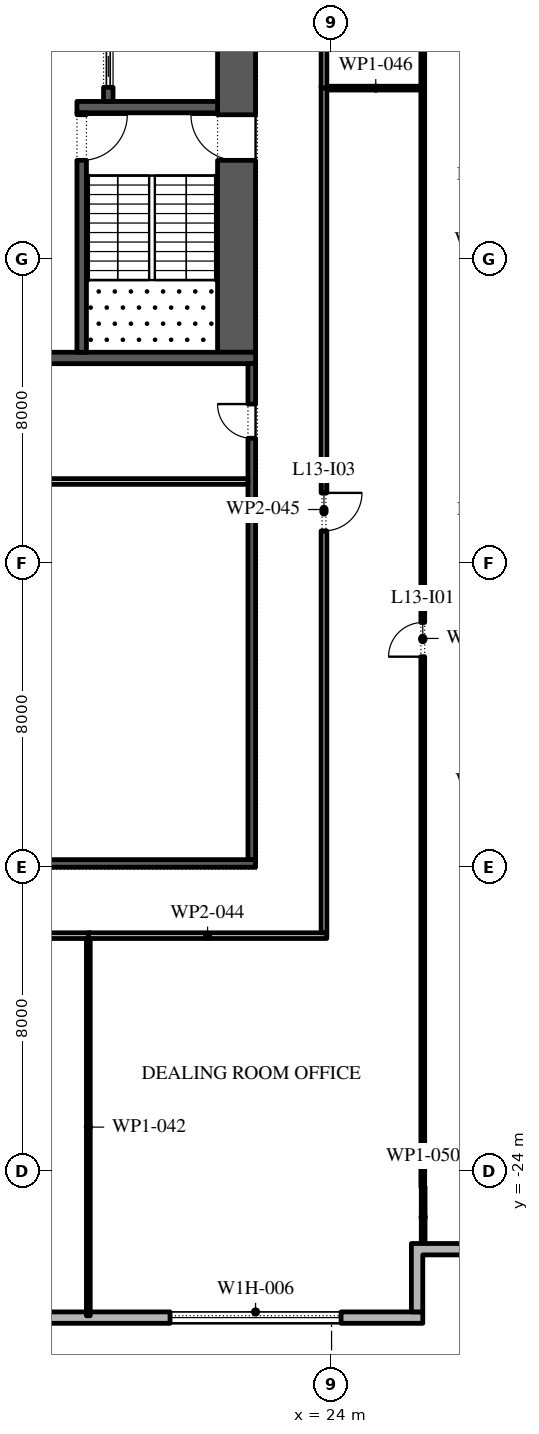
"""IFC4 building model, lengths in metres.
Left out: names, types, materials, properties, quantities, classifications, styles, units other than length and angle.
Written with IfcOpenShell. Run it as: python <this file> out.ifc"""

import sys

from ifc_helpers import new_model, si_unit, direction, frame, frame_2d, origin, place, context, subcontext, project, spatial, polyline, rectangle, outline, extrude, element, fill, save


model = new_model("IFC4")
c1 = context("Model", 3, precision=1e-05, world=origin(), true_north=direction((0.0, 1.0)))
c2 = subcontext(c1, "Body", "Model", "MODEL_VIEW")
j1 = project(units=[si_unit("LENGTHUNIT", "METRE"), si_unit("PLANEANGLEUNIT", "RADIAN")], contexts=[c1])
p1 = place(None, origin())
s1 = spatial("IfcSite", under=j1, at=p1, CompositionType="ELEMENT")
p2 = place(p1, origin())
s2 = spatial("IfcBuilding", under=s1, at=p2, CompositionType="ELEMENT")
p3 = place(p2, frame((0.0, 0.0, 64.8)))
s3 = spatial("IfcBuildingStorey", under=s2, at=p3, CompositionType="ELEMENT", Elevation=64.8)
p4 = place(p3, frame((-26.1, -27.85, 0.0), z_axis=(0.0, 0.0, 1.0), x_axis=(1.0, 0.0, 0.0)))
e1 = element("IfcWall", 1, at=p4, inside=s3, PredefinedType="STANDARD", context=c2, shape_type="SweptSolid", body=[
    extrude(rectangle(XDim=52.5, YDim=0.3, at=frame_2d((26.25, 0.0))), origin(), (0.0, 0.0, 1.0), 4.0),
])
p5 = place(p4, frame((2.0, 0.0, 0.45)))
e2 = element("IfcOpeningElement", 2, at=p5, cuts=e1, PredefinedType="OPENING", context=c2, shape_type="SweptSolid", body=[
    extrude(rectangle(XDim=4.5, YDim=2.75, at=frame_2d((2.25, 1.375))), frame((0.0, 0.16, 0.0), z_axis=(0.0, -1.0, 0.0), x_axis=(1.0, 0.0, 0.0)), (0.0, 0.0, 1.0), 0.32),
])
p6 = place(p4, frame((10.65, 0.0, 0.45)))
e3 = element("IfcOpeningElement", 3, at=p6, cuts=e1, PredefinedType="OPENING", context=c2, shape_type="SweptSolid", body=[
    extrude(rectangle(XDim=4.5, YDim=2.75, at=frame_2d((2.25, 1.375))), frame((0.0, 0.16, 0.0), z_axis=(0.0, -1.0, 0.0), x_axis=(1.0, 0.0, 0.0)), (0.0, 0.0, 1.0), 0.32),
])
p7 = place(p4, frame((20.5, 0.0, 0.0)))
e4 = element("IfcOpeningElement", 4, at=p7, cuts=e1, PredefinedType="OPENING", context=c2, shape_type="SweptSolid", body=[
    extrude(rectangle(XDim=2.4, YDim=3.5, at=frame_2d((1.2, 1.75))), frame((0.0, 0.16, 0.0), z_axis=(0.0, -1.0, 0.0), x_axis=(1.0, 0.0, 0.0)), (0.0, 0.0, 1.0), 0.32),
])
p8 = place(p4, frame((28.25, 0.0, 0.45)))
e5 = element("IfcOpeningElement", 5, at=p8, cuts=e1, PredefinedType="OPENING", context=c2, shape_type="SweptSolid", body=[
    extrude(rectangle(XDim=4.5, YDim=2.75, at=frame_2d((2.25, 1.375))), frame((0.0, 0.16, 0.0), z_axis=(0.0, -1.0, 0.0), x_axis=(1.0, 0.0, 0.0)), (0.0, 0.0, 1.0), 0.32),
])
p9 = place(p4, frame((37.05, 0.0, 0.45)))
e6 = element("IfcOpeningElement", 6, at=p9, cuts=e1, PredefinedType="OPENING", context=c2, shape_type="SweptSolid", body=[
    extrude(rectangle(XDim=4.5, YDim=2.75, at=frame_2d((2.25, 1.375))), frame((0.0, 0.16, 0.0), z_axis=(0.0, -1.0, 0.0), x_axis=(1.0, 0.0, 0.0)), (0.0, 0.0, 1.0), 0.32),
])
p10 = place(p4, frame((45.85, 0.0, 0.45)))
e7 = element("IfcOpeningElement", 7, at=p10, cuts=e1, PredefinedType="OPENING", context=c2, shape_type="SweptSolid", body=[
    extrude(rectangle(XDim=4.5, YDim=2.75, at=frame_2d((2.25, 1.375))), frame((0.0, 0.16, 0.0), z_axis=(0.0, -1.0, 0.0), x_axis=(1.0, 0.0, 0.0)), (0.0, 0.0, 1.0), 0.32),
])
p11 = place(p3, origin())
e8 = element("IfcWall", 8, at=p11, inside=s3, PredefinedType="STANDARD", context=c2, shape_type="SweptSolid", body=[
    extrude(outline(polyline([(27.9, -25.9), (27.9, -24.1), (30.0, -24.1), (30.0, -24.4), (28.2, -24.4), (28.2, -26.2), (26.4, -26.2), (26.4, -27.7), (26.1, -27.7), (26.1, -25.9), (27.9, -25.9)])), origin(), (0.0, 0.0, 1.0), 4.0),
])
p12 = place(p3, frame((21.5, -2.45, 0.0), z_axis=(0.0, 0.0, 1.0), x_axis=(0.0, 1.0, 0.0)))
e9 = element("IfcWall", 9, at=p12, inside=s3, PredefinedType="SHEAR", context=c2, shape_type="SweptSolid", body=[
    extrude(rectangle(XDim=27.9, YDim=1.0, at=frame_2d((13.95, 0.0))), origin(), (0.0, 0.0, 1.0), 4.0),
])
p13 = place(p12, frame((5.05, 0.0, 0.0)))
e10 = element("IfcOpeningElement", 10, at=p13, cuts=e9, PredefinedType="OPENING", context=c2, shape_type="SweptSolid", body=[
    extrude(rectangle(XDim=1.2, YDim=2.1, at=frame_2d((0.6, 1.05))), frame((0.0, 0.51, 0.0), z_axis=(0.0, -1.0, 0.0), x_axis=(1.0, 0.0, 0.0)), (0.0, 0.0, 1.0), 1.02),
])
p14 = place(p12, frame((21.65, 0.0, 0.0)))
e11 = element("IfcOpeningElement", 11, at=p14, cuts=e9, PredefinedType="OPENING", context=c2, shape_type="SweptSolid", body=[
    extrude(rectangle(XDim=1.2, YDim=2.1, at=frame_2d((0.6, 1.05))), frame((0.0, 0.51, 0.0), z_axis=(0.0, -1.0, 0.0), x_axis=(1.0, 0.0, 0.0)), (0.0, 0.0, 1.0), 1.02),
])
p15 = place(p3, frame((10.0, -2.6, 0.0), z_axis=(0.0, 0.0, 1.0), x_axis=(1.0, 0.0, 0.0)))
e12 = element("IfcWall", 12, at=p15, inside=s3, PredefinedType="SHEAR", context=c2, shape_type="SweptSolid", body=[
    extrude(rectangle(XDim=12.0, YDim=0.3, at=frame_2d((6.0, 0.0))), origin(), (0.0, 0.0, 1.0), 4.0),
])
p16 = place(p3, frame((17.3, 4.0, 0.0), z_axis=(0.0, 0.0, 1.0), x_axis=(1.0, 0.0, 0.0)))
e13 = element("IfcWall", 13, at=p16, inside=s3, PredefinedType="SHEAR", context=c2, shape_type="SweptSolid", body=[
    extrude(rectangle(XDim=3.7, YDim=0.3, at=frame_2d((1.85, 0.0))), origin(), (0.0, 0.0, 1.0), 4.0),
])
p17 = place(p3, frame((17.425, -2.45, 0.0), z_axis=(0.0, 0.0, 1.0), x_axis=(0.0, 1.0, 0.0)))
e14 = element("IfcWall", 14, at=p17, inside=s3, PredefinedType="SHEAR", context=c2, shape_type="SweptSolid", body=[
    extrude(rectangle(XDim=6.3, YDim=0.25, at=frame_2d((3.15, 0.0))), origin(), (0.0, 0.0, 1.0), 4.0),
])
p18 = place(p17, frame((5.05, 0.0, 0.0)))
e15 = element("IfcOpeningElement", 15, at=p18, cuts=e14, PredefinedType="OPENING", context=c2, shape_type="SweptSolid", body=[
    extrude(rectangle(XDim=1.2, YDim=2.1, at=frame_2d((0.6, 1.05))), frame((0.0, 0.135, 0.0), z_axis=(0.0, -1.0, 0.0), x_axis=(1.0, 0.0, 0.0)), (0.0, 0.0, 1.0), 0.27),
])
p19 = place(p3, frame((18.125, 4.15, 0.0), z_axis=(0.0, 0.0, 1.0), x_axis=(0.0, 1.0, 0.0)))
e16 = element("IfcWall", 16, at=p19, inside=s3, PredefinedType="SHEAR", context=c2, shape_type="SweptSolid", body=[
    extrude(rectangle(XDim=14.7, YDim=0.25, at=frame_2d((7.35, 0.0))), origin(), (0.0, 0.0, 1.0), 4.0),
])
p20 = place(p19, frame((0.371, 0.0, 0.0)))
e17 = element("IfcOpeningElement", 17, at=p20, cuts=e16, PredefinedType="OPENING", context=c2, shape_type="SweptSolid", body=[
    extrude(rectangle(XDim=1.1, YDim=2.1, at=frame_2d((0.55, 1.05))), frame((0.0, 0.135, 0.0), z_axis=(0.0, -1.0, 0.0), x_axis=(1.0, 0.0, 0.0)), (0.0, 0.0, 1.0), 0.27),
])
p21 = place(p19, frame((2.514, 0.0, 0.0)))
e18 = element("IfcOpeningElement", 18, at=p21, cuts=e16, PredefinedType="OPENING", context=c2, shape_type="SweptSolid", body=[
    extrude(rectangle(XDim=1.1, YDim=2.1, at=frame_2d((0.55, 1.05))), frame((0.0, 0.135, 0.0), z_axis=(0.0, -1.0, 0.0), x_axis=(1.0, 0.0, 0.0)), (0.0, 0.0, 1.0), 0.27),
])
p22 = place(p19, frame((4.657, 0.0, 0.0)))
e19 = element("IfcOpeningElement", 19, at=p22, cuts=e16, PredefinedType="OPENING", context=c2, shape_type="SweptSolid", body=[
    extrude(rectangle(XDim=1.1, YDim=2.1, at=frame_2d((0.55, 1.05))), frame((0.0, 0.135, 0.0), z_axis=(0.0, -1.0, 0.0), x_axis=(1.0, 0.0, 0.0)), (0.0, 0.0, 1.0), 0.27),
])
p23 = place(p19, frame((6.8, 0.0, 0.0)))
e20 = element("IfcOpeningElement", 20, at=p23, cuts=e16, PredefinedType="OPENING", context=c2, shape_type="SweptSolid", body=[
    extrude(rectangle(XDim=1.1, YDim=2.1, at=frame_2d((0.55, 1.05))), frame((0.0, 0.135, 0.0), z_axis=(0.0, -1.0, 0.0), x_axis=(1.0, 0.0, 0.0)), (0.0, 0.0, 1.0), 0.27),
])
p24 = place(p19, frame((8.943, 0.0, 0.0)))
e21 = element("IfcOpeningElement", 21, at=p24, cuts=e16, PredefinedType="OPENING", context=c2, shape_type="SweptSolid", body=[
    extrude(rectangle(XDim=1.1, YDim=2.1, at=frame_2d((0.55, 1.05))), frame((0.0, 0.135, 0.0), z_axis=(0.0, -1.0, 0.0), x_axis=(1.0, 0.0, 0.0)), (0.0, 0.0, 1.0), 0.27),
])
p25 = place(p19, frame((11.086, 0.0, 0.0)))
e22 = element("IfcOpeningElement", 22, at=p25, cuts=e16, PredefinedType="OPENING", context=c2, shape_type="SweptSolid", body=[
    extrude(rectangle(XDim=1.1, YDim=2.1, at=frame_2d((0.55, 1.05))), frame((0.0, 0.135, 0.0), z_axis=(0.0, -1.0, 0.0), x_axis=(1.0, 0.0, 0.0)), (0.0, 0.0, 1.0), 0.27),
])
p26 = place(p19, frame((13.229, 0.0, 0.0)))
e23 = element("IfcOpeningElement", 23, at=p26, cuts=e16, PredefinedType="OPENING", context=c2, shape_type="SweptSolid", body=[
    extrude(rectangle(XDim=1.1, YDim=2.1, at=frame_2d((0.55, 1.05))), frame((0.0, 0.135, 0.0), z_axis=(0.0, -1.0, 0.0), x_axis=(1.0, 0.0, 0.0)), (0.0, 0.0, 1.0), 0.27),
])
p27 = place(p3, frame((21.9, -15.8, 0.0), z_axis=(0.0, 0.0, 1.0), x_axis=(0.0, 1.0, 0.0)))
e24 = element("IfcWall", 24, at=p27, inside=s3, PredefinedType="SHEAR", context=c2, shape_type="SweptSolid", body=[
    extrude(rectangle(XDim=13.05, YDim=0.2, at=frame_2d((6.525, 0.0))), origin(), (0.0, 0.0, 1.0), 4.0),
])
p28 = place(p27, frame((11.087, 0.0, 0.0)))
e25 = element("IfcOpeningElement", 25, at=p28, cuts=e24, PredefinedType="OPENING", context=c2, shape_type="SweptSolid", body=[
    extrude(rectangle(XDim=0.9, YDim=2.1, at=frame_2d((0.45, 1.05))), frame((0.0, 0.11, 0.0), z_axis=(0.0, -1.0, 0.0), x_axis=(1.0, 0.0, 0.0)), (0.0, 0.0, 1.0), 0.22),
])
p29 = place(p3, frame((10.0, -15.9, 0.0), z_axis=(0.0, 0.0, 1.0), x_axis=(1.0, 0.0, 0.0)))
e26 = element("IfcWall", 26, at=p29, inside=s3, PredefinedType="SHEAR", context=c2, shape_type="SweptSolid", body=[
    extrude(rectangle(XDim=12.0, YDim=0.2, at=frame_2d((6.0, 0.0))), origin(), (0.0, 0.0, 1.0), 4.0),
])
p30 = place(p3, frame((10.2, -5.85, 0.0), z_axis=(0.0, 0.0, 1.0), x_axis=(1.0, 0.0, 0.0)))
e27 = element("IfcWall", 27, at=p30, inside=s3, PredefinedType="PARTITIONING", context=c2, shape_type="SweptSolid", body=[
    extrude(rectangle(XDim=11.6, YDim=0.15, at=frame_2d((5.8, 0.0))), origin(), (0.0, 0.0, 1.0), 4.0),
])
p31 = place(p3, frame((17.65, -17.8, 0.0), z_axis=(0.0, 0.0, 1.0), x_axis=(-1.0, 0.0, 0.0)))
e28 = element("IfcWall", 28, at=p31, inside=s3, PredefinedType="PARTITIONING", context=c2, shape_type="SweptSolid", body=[
    extrude(rectangle(XDim=8.8, YDim=0.15, at=frame_2d((4.4, 0.0))), origin(), (0.0, 0.0, 1.0), 4.0),
])
p32 = place(p31, frame((5.7, 0.0, 0.0)))
e29 = element("IfcOpeningElement", 29, at=p32, cuts=e28, PredefinedType="OPENING", context=c2, shape_type="SweptSolid", body=[
    extrude(rectangle(XDim=1.0, YDim=2.1, at=frame_2d((0.5, 1.05))), frame((0.0, 0.085, 0.0), z_axis=(0.0, -1.0, 0.0), x_axis=(1.0, 0.0, 0.0)), (0.0, 0.0, 1.0), 0.17),
])
p33 = place(p3, frame((17.6, -17.875, 0.0), z_axis=(0.0, 0.0, 1.0), x_axis=(0.0, -1.0, 0.0)))
e30 = element("IfcWall", 30, at=p33, inside=s3, PredefinedType="PARTITIONING", context=c2, shape_type="SweptSolid", body=[
    extrude(rectangle(XDim=9.925, YDim=0.1, at=frame_2d((4.962, 0.0))), origin(), (0.0, 0.0, 1.0), 4.0),
])
p34 = place(p3, frame((23.875, -17.8, 0.0), z_axis=(0.0, 0.0, 1.0), x_axis=(-1.0, 0.0, 0.0)))
e31 = element("IfcWall", 31, at=p34, inside=s3, PredefinedType="PARTITIONING", context=c2, shape_type="SweptSolid", body=[
    extrude(rectangle(XDim=6.275, YDim=0.15, at=frame_2d((3.137, 0.0))), origin(), (0.0, 0.0, 1.0), 4.0),
])
p35 = place(p3, frame((23.8, 4.55, 0.0), z_axis=(0.0, 0.0, 1.0), x_axis=(0.0, -1.0, 0.0)))
e32 = element("IfcWall", 32, at=p35, inside=s3, PredefinedType="PARTITIONING", context=c2, shape_type="SweptSolid", body=[
    extrude(rectangle(XDim=22.275, YDim=0.15, at=frame_2d((11.138, 0.0))), origin(), (0.0, 0.0, 1.0), 4.0),
])
p36 = place(p35, frame((10.7, 0.0, 0.0)))
e33 = element("IfcOpeningElement", 33, at=p36, cuts=e32, PredefinedType="OPENING", context=c2, shape_type="SweptSolid", body=[
    extrude(rectangle(XDim=1.0, YDim=2.1, at=frame_2d((0.5, 1.05))), frame((0.0, 0.085, 0.0), z_axis=(0.0, -1.0, 0.0), x_axis=(1.0, 0.0, 0.0)), (0.0, 0.0, 1.0), 0.17),
])
p37 = place(p3, frame((23.875, 4.5, 0.0), z_axis=(0.0, 0.0, 1.0), x_axis=(1.0, 0.0, 0.0)))
e34 = element("IfcWall", 34, at=p37, inside=s3, PredefinedType="PARTITIONING", context=c2, shape_type="SweptSolid", body=[
    extrude(rectangle(XDim=2.575, YDim=0.1, at=frame_2d((1.288, 0.0))), origin(), (0.0, 0.0, 1.0), 4.0),
])
p38 = place(p3, frame((23.8, 27.2, 0.0), z_axis=(0.0, 0.0, 1.0), x_axis=(0.0, -1.0, 0.0)))
e35 = element("IfcWall", 35, at=p38, inside=s3, PredefinedType="PARTITIONING", context=c2, shape_type="SweptSolid", body=[
    extrude(rectangle(XDim=22.7, YDim=0.15, at=frame_2d((11.35, 0.0))), origin(), (0.0, 0.0, 1.0), 4.0),
])
p39 = place(p38, frame((10.8, 0.0, 0.0)))
e36 = element("IfcOpeningElement", 36, at=p39, cuts=e35, PredefinedType="OPENING", context=c2, shape_type="SweptSolid", body=[
    extrude(rectangle(XDim=1.0, YDim=2.1, at=frame_2d((0.5, 1.05))), frame((0.0, 0.085, 0.0), z_axis=(0.0, -1.0, 0.0), x_axis=(1.0, 0.0, 0.0)), (0.0, 0.0, 1.0), 0.17),
])
p40 = place(p3, frame((26.4, -24.41, 0.0), z_axis=(0.0, 0.0, 1.0), x_axis=(0.0, 1.0, 0.0)))
e37 = element("IfcWall", 37, at=p40, inside=s3, PredefinedType="PARTITIONING", context=c2, shape_type="SweptSolid", body=[
    extrude(rectangle(XDim=28.86, YDim=0.1, at=frame_2d((14.43, 0.0))), origin(), (0.0, 0.0, 1.0), 4.0),
])
p41 = place(p40, frame((13.95, 0.0, 0.0)))
e38 = element("IfcOpeningElement", 38, at=p41, cuts=e37, PredefinedType="OPENING", context=c2, shape_type="SweptSolid", body=[
    extrude(rectangle(XDim=0.9, YDim=2.1, at=frame_2d((0.45, 1.05))), frame((0.0, 0.06, 0.0), z_axis=(0.0, -1.0, 0.0), x_axis=(1.0, 0.0, 0.0)), (0.0, 0.0, 1.0), 0.12),
])
p42 = place(p3, frame((26.4, 4.55, 0.0), z_axis=(0.0, 0.0, 1.0), x_axis=(0.0, 1.0, 0.0)))
e39 = element("IfcWall", 39, at=p42, inside=s3, PredefinedType="PARTITIONING", context=c2, shape_type="SweptSolid", body=[
    extrude(rectangle(XDim=20.86, YDim=0.1, at=frame_2d((10.43, 0.0))), origin(), (0.0, 0.0, 1.0), 4.0),
])
p43 = place(p3, frame((26.41, -26.0, 0.0), z_axis=(0.0, 0.0, 1.0), x_axis=(0.0, 1.0, 0.0)))
e40 = element("IfcWall", 40, at=p43, inside=s3, PredefinedType="PARTITIONING", context=c2, shape_type="SweptSolid", body=[
    extrude(rectangle(XDim=1.59, YDim=0.1, at=frame_2d((0.795, 0.0))), origin(), (0.0, 0.0, 1.0), 4.0),
])
p44 = place(p10, origin())
e41 = element("IfcWindow", 41, at=p44, inside=s3, PartitioningType="DOUBLE_PANEL_VERTICAL", PredefinedType="WINDOW", context=c2, shape_type="SweptSolid", body=[
    extrude(rectangle(XDim=4.5, YDim=2.75, at=frame_2d((2.25, 1.375))), frame((0.0, 0.03, 0.0), z_axis=(0.0, -1.0, 0.0), x_axis=(1.0, 0.0, 0.0)), (0.0, 0.0, 1.0), 0.06),
])
fill(e7, e41)
p45 = place(p20, origin())
e42 = element("IfcDoor", 42, at=p45, inside=s3, OperationType="SLIDING_TO_LEFT", PredefinedType="DOOR", context=c2, shape_type="SweptSolid", body=[
    extrude(rectangle(XDim=1.1, YDim=2.1, at=frame_2d((0.55, 1.05))), frame((0.0, 0.025, 0.0), z_axis=(0.0, -1.0, 0.0), x_axis=(1.0, 0.0, 0.0)), (0.0, 0.0, 1.0), 0.05),
])
fill(e17, e42)
p46 = place(p18, frame((1.2, 0.0, 0.0), z_axis=(0.0, 0.0, 1.0), x_axis=(-1.0, 0.0, 0.0)))
e43 = element("IfcDoor", 43, at=p46, inside=s3, OperationType="SINGLE_SWING_RIGHT", PredefinedType="DOOR", context=c2, shape_type="SweptSolid", body=[
    extrude(rectangle(XDim=1.2, YDim=2.1, at=frame_2d((0.6, 1.05))), frame((0.0, 0.025, 0.0), z_axis=(0.0, -1.0, 0.0), x_axis=(1.0, 0.0, 0.0)), (0.0, 0.0, 1.0), 0.05),
])
fill(e15, e43)
p47 = place(p13, origin())
e44 = element("IfcDoor", 44, at=p47, inside=s3, OperationType="SINGLE_SWING_LEFT", PredefinedType="DOOR", context=c2, shape_type="SweptSolid", body=[
    extrude(rectangle(XDim=1.2, YDim=2.1, at=frame_2d((0.6, 1.05))), frame((0.0, 0.025, 0.0), z_axis=(0.0, -1.0, 0.0), x_axis=(1.0, 0.0, 0.0)), (0.0, 0.0, 1.0), 0.05),
])
fill(e10, e44)
p48 = place(p28, origin())
e45 = element("IfcDoor", 45, at=p48, inside=s3, OperationType="SINGLE_SWING_LEFT", PredefinedType="DOOR", context=c2, shape_type="SweptSolid", body=[
    extrude(rectangle(XDim=0.9, YDim=2.1, at=frame_2d((0.45, 1.05))), frame((0.0, 0.1, 0.0), z_axis=(0.0, -1.0, 0.0), x_axis=(1.0, 0.0, 0.0)), (0.0, 0.0, 1.0), 0.05),
])
fill(e25, e45)
p49 = place(p41, origin())
e46 = element("IfcDoor", 46, at=p49, inside=s3, OperationType="SINGLE_SWING_RIGHT", PredefinedType="DOOR", context=c2, shape_type="SweptSolid", body=[
    extrude(rectangle(XDim=0.9, YDim=2.1, at=frame_2d((0.45, 1.05))), frame((0.0, 0.025, 0.0), z_axis=(0.0, -1.0, 0.0), x_axis=(1.0, 0.0, 0.0)), (0.0, 0.0, 1.0), 0.05),
])
fill(e38, e46)
p50 = place(p36, origin())
e47 = element("IfcDoor", 47, at=p50, inside=s3, OperationType="SINGLE_SWING_RIGHT", PredefinedType="DOOR", context=c2, shape_type="SweptSolid", body=[
    extrude(rectangle(XDim=1.0, YDim=2.1, at=frame_2d((0.5, 1.05))), frame((0.0, 0.025, 0.0), z_axis=(0.0, -1.0, 0.0), x_axis=(1.0, 0.0, 0.0)), (0.0, 0.0, 1.0), 0.05),
])
fill(e33, e47)
save(model, sys.argv[1])
